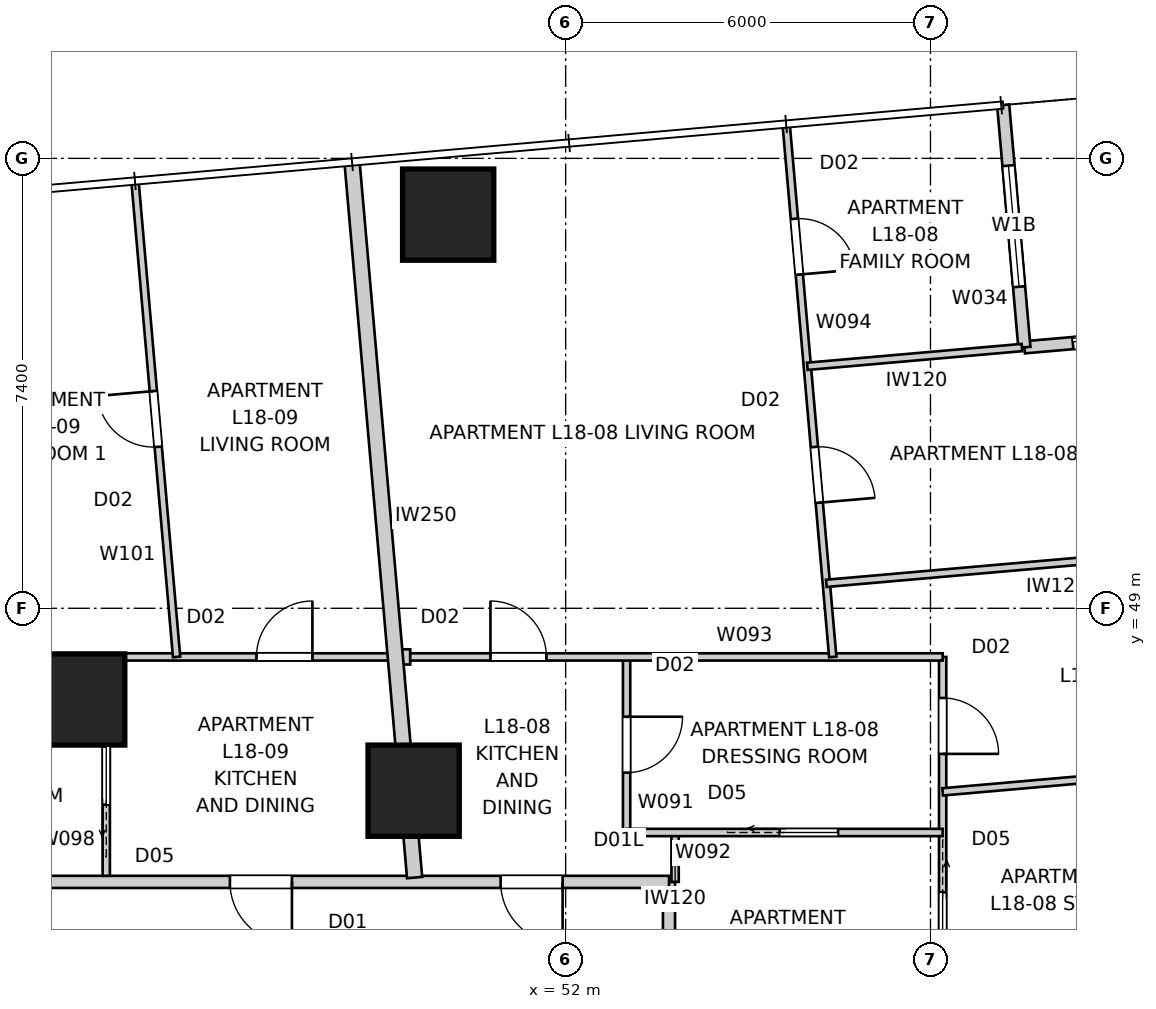
"""IFC4 building model, lengths in metres.
Left out: names, types, materials, properties, quantities, classifications, styles, units other than length and angle.
Written with IfcOpenShell. Run it as: python <this file> out.ifc"""

import sys

from ifc_helpers import new_model, si_unit, direction, frame, frame_2d, origin, origin_2d, place, context, subcontext, project, spatial, rectangle, extrude, element, fill, save


model = new_model("IFC4")
c1 = context("Model", 3, precision=1e-05, world=origin(), true_north=direction((0.0, 1.0)))
c2 = subcontext(c1, "Body", "Model", "MODEL_VIEW")
j1 = project(units=[si_unit("LENGTHUNIT", "METRE"), si_unit("PLANEANGLEUNIT", "RADIAN")], contexts=[c1])
p1 = place(None, origin())
s1 = spatial("IfcSite", under=j1, at=p1, CompositionType="ELEMENT")
p2 = place(p1, origin())
s2 = spatial("IfcBuilding", under=s1, at=p2, CompositionType="ELEMENT")
p3 = place(p2, frame((0.0, 0.0, 67.6)))
s3 = spatial("IfcBuildingStorey", under=s2, at=p3, CompositionType="ELEMENT", Elevation=67.6)
for number, where, z_axis, x_axis in (
    (1, (50.068, 55.474, 0.0), (0.0, 0.0, 1.0), (1.0, 0.0, 0.0)),
    (2, (49.5, 46.0, 0.0), (0.0, 0.0, 1.0), (1.0, 0.0, 0.0)),
    (3, (44.0, 47.5, 0.0), (0.0, 0.0, 1.0), (1.0, 0.0, 0.0)),
):
    element("IfcColumn", number, at=place(p3, frame(where, z_axis=z_axis, x_axis=x_axis)), inside=s3, PredefinedType="COLUMN", context=c2, shape_type="SweptSolid", body=[
        extrude(rectangle(XDim=1.5, YDim=1.5, at=origin_2d()), origin(), (0.0, 0.0, 1.0), 3.4),
    ])
p4 = place(p3, frame((63.529, 53.641, 0.0), z_axis=(0.0, 0.0, 1.0), x_axis=(-0.99619418125, -0.087161650072, 0.0)))
e4 = element("IfcWall", 4, at=p4, inside=s3, PredefinedType="SOLIDWALL", context=c2, shape_type="SweptSolid", body=[
    extrude(rectangle(XDim=4.0, YDim=0.2, at=frame_2d((2.0, 0.0))), origin(), (0.0, 0.0, 1.0), 3.25),
])
p5 = place(p4, frame((0.8, 0.0, 0.0)))
e5 = element("IfcOpeningElement", 5, at=p5, cuts=e4, PredefinedType="OPENING", context=c2, shape_type="SweptSolid", body=[
    extrude(rectangle(XDim=2.4, YDim=2.1, at=frame_2d((1.2, 1.05))), frame((0.0, 0.11, 0.0), z_axis=(0.0, -1.0, 0.0), x_axis=(1.0, 0.0, 0.0)), (0.0, 0.0, 1.0), 0.22),
])
p6 = place(p3, frame((59.544, 53.292, 0.0), z_axis=(0.0, 0.0, 1.0), x_axis=(-0.087156350505, 0.99619464492, 0.0)))
e6 = element("IfcWall", 6, at=p6, inside=s3, PredefinedType="SOLIDWALL", context=c2, shape_type="SweptSolid", body=[
    extrude(rectangle(XDim=4.0, YDim=0.2, at=frame_2d((2.0, 0.0))), origin(), (0.0, 0.0, 1.0), 3.25),
])
p7 = place(p6, frame((1.0, 0.0, 0.45)))
e7 = element("IfcOpeningElement", 7, at=p7, cuts=e6, PredefinedType="OPENING", context=c2, shape_type="SweptSolid", body=[
    extrude(rectangle(XDim=2.0, YDim=1.8, at=frame_2d((1.0, 0.9))), frame((0.0, 0.11, 0.0), z_axis=(0.0, -1.0, 0.0), x_axis=(1.0, 0.0, 0.0)), (0.0, 0.0, 1.0), 0.22),
])
p8 = place(p3, frame((53.7, 16.3, 0.0), z_axis=(0.0, 0.0, 1.0), x_axis=(0.0, 1.0, 0.0)))
e8 = element("IfcWall", 8, at=p8, inside=s3, PredefinedType="PARTITIONING", context=c2, shape_type="SweptSolid", body=[
    extrude(rectangle(XDim=28.2, YDim=0.2, at=frame_2d((14.1, 0.0))), origin(), (0.0, 0.0, 1.0), 3.25),
])
p9 = place(p8, frame((15.716, 0.0, 0.0)))
e9 = element("IfcOpeningElement", 9, at=p9, cuts=e8, PredefinedType="OPENING", context=c2, shape_type="SweptSolid", body=[
    extrude(rectangle(XDim=1.02, YDim=2.34, at=frame_2d((0.51, 1.17))), frame((0.0, 0.11, 0.0), z_axis=(0.0, -1.0, 0.0), x_axis=(1.0, 0.0, 0.0)), (0.0, 0.0, 1.0), 0.22),
])
p10 = place(p8, frame((5.572, 0.0, 0.0)))
e10 = element("IfcOpeningElement", 10, at=p10, cuts=e8, PredefinedType="OPENING", context=c2, shape_type="SweptSolid", body=[
    extrude(rectangle(XDim=1.02, YDim=2.34, at=frame_2d((0.51, 1.17))), frame((0.0, 0.11, 0.0), z_axis=(0.0, -1.0, 0.0), x_axis=(1.0, 0.0, 0.0)), (0.0, 0.0, 1.0), 0.22),
])
p11 = place(p8, frame((1.715, 0.0, 0.0)))
e11 = element("IfcOpeningElement", 11, at=p11, cuts=e8, PredefinedType="OPENING", context=c2, shape_type="SweptSolid", body=[
    extrude(rectangle(XDim=1.02, YDim=2.1, at=frame_2d((0.51, 1.05))), frame((0.0, 0.11, 0.0), z_axis=(0.0, -1.0, 0.0), x_axis=(1.0, 0.0, 0.0)), (0.0, 0.0, 1.0), 0.22),
])
p12 = place(p3, frame((53.7, 44.5, 0.0), z_axis=(0.0, 0.0, 1.0), x_axis=(-1.0, 0.0, 0.0)))
e12 = element("IfcWall", 12, at=p12, inside=s3, PredefinedType="PARTITIONING", context=c2, shape_type="SweptSolid", body=[
    extrude(rectangle(XDim=28.2, YDim=0.2, at=frame_2d((14.1, 0.0))), origin(), (0.0, 0.0, 1.0), 3.25),
])
p13 = place(p12, frame((21.321, 0.0, 0.0)))
e13 = element("IfcOpeningElement", 13, at=p13, cuts=e12, PredefinedType="OPENING", context=c2, shape_type="SweptSolid", body=[
    extrude(rectangle(XDim=1.02, YDim=2.34, at=frame_2d((0.51, 1.17))), frame((0.0, 0.11, 0.0), z_axis=(0.0, -1.0, 0.0), x_axis=(1.0, 0.0, 0.0)), (0.0, 0.0, 1.0), 0.22),
])
p14 = place(p12, frame((6.201, 0.0, 0.0)))
e14 = element("IfcOpeningElement", 14, at=p14, cuts=e12, PredefinedType="OPENING", context=c2, shape_type="SweptSolid", body=[
    extrude(rectangle(XDim=1.02, YDim=2.34, at=frame_2d((0.51, 1.17))), frame((0.0, 0.11, 0.0), z_axis=(0.0, -1.0, 0.0), x_axis=(1.0, 0.0, 0.0)), (0.0, 0.0, 1.0), 0.22),
])
p15 = place(p12, frame((1.75, 0.0, 0.0)))
e15 = element("IfcOpeningElement", 15, at=p15, cuts=e12, PredefinedType="OPENING", context=c2, shape_type="SweptSolid", body=[
    extrude(rectangle(XDim=1.02, YDim=2.1, at=frame_2d((0.51, 1.05))), frame((0.0, 0.11, 0.0), z_axis=(0.0, -1.0, 0.0), x_axis=(1.0, 0.0, 0.0)), (0.0, 0.0, 1.0), 0.22),
])
p16 = place(p3, frame((48.487, 56.34, 0.0), z_axis=(0.0, 0.0, 1.0), x_axis=(0.087168232078, -0.996193605338, 0.0)))
e16 = element("IfcWall", 16, at=p16, inside=s3, PredefinedType="PARTITIONING", context=c2, shape_type="SweptSolid", body=[
    extrude(rectangle(XDim=11.814, YDim=0.25, at=frame_2d((5.907, 0.0))), origin(), (0.0, 0.0, 1.0), 3.25),
])
p17 = place(p3, frame((49.223, 48.2, 0.0), z_axis=(0.0, 0.0, 1.0), x_axis=(0.999999388167, -0.001106194013, 0.0)))
e17 = element("IfcWall", 17, at=p17, inside=s3, PredefinedType="PARTITIONING", context=c2, shape_type="SweptSolid", body=[
    extrude(rectangle(XDim=0.221, YDim=0.25, at=frame_2d((0.11, 0.0))), origin(), (0.0, 0.0, 1.0), 3.25),
])
p18 = place(p3, frame((58.2, 48.2, 0.0), z_axis=(0.0, 0.0, 1.0), x_axis=(0.0, -1.0, 0.0)))
e18 = element("IfcWall", 18, at=p18, inside=s3, PredefinedType="PARTITIONING", context=c2, shape_type="SweptSolid", body=[
    extrude(rectangle(XDim=20.7, YDim=0.12, at=frame_2d((10.35, 0.0))), origin(), (0.0, 0.0, 1.0), 3.25),
])
p19 = place(p18, frame((15.095, 0.0, 0.0)))
e19 = element("IfcOpeningElement", 19, at=p19, cuts=e18, PredefinedType="OPENING", context=c2, shape_type="SweptSolid", body=[
    extrude(rectangle(XDim=0.92, YDim=2.34, at=frame_2d((0.46, 1.17))), frame((0.0, 0.07, 0.0), z_axis=(0.0, -1.0, 0.0), x_axis=(1.0, 0.0, 0.0)), (0.0, 0.0, 1.0), 0.14),
])
p20 = place(p18, frame((18.521, 0.0, 0.0)))
e20 = element("IfcOpeningElement", 20, at=p20, cuts=e18, PredefinedType="OPENING", context=c2, shape_type="SweptSolid", body=[
    extrude(rectangle(XDim=0.96, YDim=2.1, at=frame_2d((0.48, 1.05))), frame((0.0, 0.07, 0.0), z_axis=(0.0, -1.0, 0.0), x_axis=(1.0, 0.0, 0.0)), (0.0, 0.0, 1.0), 0.14),
])
p21 = place(p18, frame((0.675, 0.0, 0.0)))
e21 = element("IfcOpeningElement", 21, at=p21, cuts=e18, PredefinedType="OPENING", context=c2, shape_type="SweptSolid", body=[
    extrude(rectangle(XDim=0.92, YDim=2.34, at=frame_2d((0.46, 1.17))), frame((0.0, 0.07, 0.0), z_axis=(0.0, -1.0, 0.0), x_axis=(1.0, 0.0, 0.0)), (0.0, 0.0, 1.0), 0.14),
])
p22 = place(p18, frame((3.872, 0.0, 0.0)))
e22 = element("IfcOpeningElement", 22, at=p22, cuts=e18, PredefinedType="OPENING", context=c2, shape_type="SweptSolid", body=[
    extrude(rectangle(XDim=0.96, YDim=2.1, at=frame_2d((0.48, 1.05))), frame((0.0, 0.07, 0.0), z_axis=(0.0, -1.0, 0.0), x_axis=(1.0, 0.0, 0.0)), (0.0, 0.0, 1.0), 0.14),
])
p23 = place(p3, frame((53.8, 45.312, 0.0), z_axis=(0.0, 0.0, 1.0), x_axis=(0.0, -1.0, 0.0)))
e23 = element("IfcWall", 23, at=p23, inside=s3, PredefinedType="PARTITIONING", context=c2, shape_type="SweptSolid", body=[
    extrude(rectangle(XDim=0.812, YDim=0.12, at=frame_2d((0.406, 0.0))), origin(), (0.0, 0.0, 1.0), 3.25),
])
p24 = place(p3, frame((53.002, 48.2, 0.0), z_axis=(0.0, 0.0, 1.0), x_axis=(0.0, -1.0, 0.0)))
e24 = element("IfcWall", 24, at=p24, inside=s3, PredefinedType="PARTITIONING", context=c2, shape_type="SweptSolid", body=[
    extrude(rectangle(XDim=2.887, YDim=0.12, at=frame_2d((1.444, 0.0))), origin(), (0.0, 0.0, 1.0), 2.638),
])
p25 = place(p24, frame((0.984, 0.0, 0.0)))
e25 = element("IfcOpeningElement", 25, at=p25, cuts=e24, PredefinedType="OPENING", context=c2, shape_type="SweptSolid", body=[
    extrude(rectangle(XDim=0.92, YDim=2.34, at=frame_2d((0.46, 1.17))), frame((0.0, 0.07, 0.0), z_axis=(0.0, -1.0, 0.0), x_axis=(1.0, 0.0, 0.0)), (0.0, 0.0, 1.0), 0.14),
])
p26 = place(p3, frame((53.002, 45.312, 0.0), z_axis=(0.0, 0.0, 1.0), x_axis=(1.0, 0.0, 0.0)))
e26 = element("IfcWall", 26, at=p26, inside=s3, PredefinedType="PARTITIONING", context=c2, shape_type="SweptSolid", body=[
    extrude(rectangle(XDim=5.198, YDim=0.12, at=frame_2d((2.599, 0.0))), origin(), (0.0, 0.0, 1.0), 3.25),
])
p27 = place(p26, frame((2.518, 0.0, 0.0)))
e27 = element("IfcOpeningElement", 27, at=p27, cuts=e26, PredefinedType="OPENING", context=c2, shape_type="SweptSolid", body=[
    extrude(rectangle(XDim=0.96, YDim=2.1, at=frame_2d((0.48, 1.05))), frame((0.0, 0.07, 0.0), z_axis=(0.0, -1.0, 0.0), x_axis=(1.0, 0.0, 0.0)), (0.0, 0.0, 1.0), 0.14),
])
p28 = place(p3, frame((49.444, 48.2, 0.0), z_axis=(0.0, 0.0, 1.0), x_axis=(1.0, 0.0, 0.0)))
e28 = element("IfcWall", 28, at=p28, inside=s3, PredefinedType="PARTITIONING", context=c2, shape_type="SweptSolid", body=[
    extrude(rectangle(XDim=8.756, YDim=0.12, at=frame_2d((4.378, 0.0))), origin(), (0.0, 0.0, 1.0), 3.25),
])
p29 = place(p28, frame((1.319, 0.0, 0.0)))
e29 = element("IfcOpeningElement", 29, at=p29, cuts=e28, PredefinedType="OPENING", context=c2, shape_type="SweptSolid", body=[
    extrude(rectangle(XDim=0.92, YDim=2.34, at=frame_2d((0.46, 1.17))), frame((0.0, 0.07, 0.0), z_axis=(0.0, -1.0, 0.0), x_axis=(1.0, 0.0, 0.0)), (0.0, 0.0, 1.0), 0.14),
])
p30 = place(p3, frame((55.629, 56.925, 0.0), z_axis=(0.0, 0.0, 1.0), x_axis=(0.087169716747, -0.996193475426, 0.0)))
e30 = element("IfcWall", 30, at=p30, inside=s3, PredefinedType="PARTITIONING", context=c2, shape_type="SweptSolid", body=[
    extrude(rectangle(XDim=8.758, YDim=0.12, at=frame_2d((4.379, 0.0))), origin(), (0.0, 0.0, 1.0), 3.25),
])
p31 = place(p30, frame((1.525, 0.0, 0.0)))
e31 = element("IfcOpeningElement", 31, at=p31, cuts=e30, PredefinedType="OPENING", context=c2, shape_type="SweptSolid", body=[
    extrude(rectangle(XDim=0.92, YDim=2.34, at=frame_2d((0.46, 1.17))), frame((0.0, 0.07, 0.0), z_axis=(0.0, -1.0, 0.0), x_axis=(1.0, 0.0, 0.0)), (0.0, 0.0, 1.0), 0.14),
])
p32 = place(p30, frame((5.292, 0.0, 0.0)))
e32 = element("IfcOpeningElement", 32, at=p32, cuts=e30, PredefinedType="OPENING", context=c2, shape_type="SweptSolid", body=[
    extrude(rectangle(XDim=0.92, YDim=2.34, at=frame_2d((0.46, 1.17))), frame((0.0, 0.07, 0.0), z_axis=(0.0, -1.0, 0.0), x_axis=(1.0, 0.0, 0.0)), (0.0, 0.0, 1.0), 0.14),
])
p33 = place(p3, frame((63.802, 50.067, 0.0), z_axis=(0.0, 0.0, 1.0), x_axis=(-0.996194420069, -0.087158920508, 0.0)))
e33 = element("IfcWall", 33, at=p33, inside=s3, PredefinedType="PARTITIONING", context=c2, shape_type="SweptSolid", body=[
    extrude(rectangle(XDim=7.543, YDim=0.12, at=frame_2d((3.772, 0.0))), origin(), (0.0, 0.0, 1.0), 3.25),
])
p34 = place(p3, frame((55.975, 52.98, 0.0), z_axis=(0.0, 0.0, 1.0), x_axis=(0.996194166221, 0.087161821847, 0.0)))
e34 = element("IfcWall", 34, at=p34, inside=s3, PredefinedType="PARTITIONING", context=c2, shape_type="SweptSolid", body=[
    extrude(rectangle(XDim=3.543, YDim=0.12, at=frame_2d((1.771, 0.0))), origin(), (0.0, 0.0, 1.0), 3.25),
])
p35 = place(p3, frame((64.114, 46.498, 0.0), z_axis=(0.0, 0.0, 1.0), x_axis=(-0.996195547509, -0.087146033323, 0.0)))
e35 = element("IfcWall", 35, at=p35, inside=s3, PredefinedType="PARTITIONING", context=c2, shape_type="SweptSolid", body=[
    extrude(rectangle(XDim=5.937, YDim=0.12, at=frame_2d((2.968, 0.0))), origin(), (0.0, 0.0, 1.0), 2.638),
])
p36 = place(p3, frame((44.445, 44.6, 0.0), z_axis=(0.0, 0.0, 1.0), x_axis=(0.0, 1.0, 0.0)))
e36 = element("IfcWall", 36, at=p36, inside=s3, PredefinedType="PARTITIONING", context=c2, shape_type="SweptSolid", body=[
    extrude(rectangle(XDim=3.6, YDim=0.12, at=frame_2d((1.8, 0.0))), origin(), (0.0, 0.0, 1.0), 3.25),
])
p37 = place(p36, frame((1.17, 0.0, 0.0)))
e37 = element("IfcOpeningElement", 37, at=p37, cuts=e36, PredefinedType="OPENING", context=c2, shape_type="SweptSolid", body=[
    extrude(rectangle(XDim=0.96, YDim=2.1, at=frame_2d((0.48, 1.05))), frame((0.0, 0.07, 0.0), z_axis=(0.0, -1.0, 0.0), x_axis=(1.0, 0.0, 0.0)), (0.0, 0.0, 1.0), 0.14),
])
p38 = place(p3, frame((21.8, 48.2, 0.0), z_axis=(0.0, 0.0, 1.0), x_axis=(1.0, 0.0, 0.0)))
e38 = element("IfcWall", 38, at=p38, inside=s3, PredefinedType="PARTITIONING", context=c2, shape_type="SweptSolid", body=[
    extrude(rectangle(XDim=27.399, YDim=0.12, at=frame_2d((13.699, 0.0))), origin(), (0.0, 0.0, 1.0), 3.25),
])
p39 = place(p38, frame((7.18, 0.0, 0.0)))
e39 = element("IfcOpeningElement", 39, at=p39, cuts=e38, PredefinedType="OPENING", context=c2, shape_type="SweptSolid", body=[
    extrude(rectangle(XDim=0.92, YDim=2.34, at=frame_2d((0.46, 1.17))), frame((0.0, 0.07, 0.0), z_axis=(0.0, -1.0, 0.0), x_axis=(1.0, 0.0, 0.0)), (0.0, 0.0, 1.0), 0.14),
])
p40 = place(p38, frame((10.167, 0.0, 0.0)))
e40 = element("IfcOpeningElement", 40, at=p40, cuts=e38, PredefinedType="OPENING", context=c2, shape_type="SweptSolid", body=[
    extrude(rectangle(XDim=0.92, YDim=2.34, at=frame_2d((0.46, 1.17))), frame((0.0, 0.07, 0.0), z_axis=(0.0, -1.0, 0.0), x_axis=(1.0, 0.0, 0.0)), (0.0, 0.0, 1.0), 0.14),
])
p41 = place(p38, frame((25.115, 0.0, 0.0)))
e41 = element("IfcOpeningElement", 41, at=p41, cuts=e38, PredefinedType="OPENING", context=c2, shape_type="SweptSolid", body=[
    extrude(rectangle(XDim=0.92, YDim=2.34, at=frame_2d((0.46, 1.17))), frame((0.0, 0.07, 0.0), z_axis=(0.0, -1.0, 0.0), x_axis=(1.0, 0.0, 0.0)), (0.0, 0.0, 1.0), 0.14),
])
p42 = place(p38, frame((3.513, 0.0, 0.0)))
e42 = element("IfcOpeningElement", 42, at=p42, cuts=e38, PredefinedType="OPENING", context=c2, shape_type="SweptSolid", body=[
    extrude(rectangle(XDim=0.96, YDim=2.1, at=frame_2d((0.48, 1.05))), frame((0.0, 0.07, 0.0), z_axis=(0.0, -1.0, 0.0), x_axis=(1.0, 0.0, 0.0)), (0.0, 0.0, 1.0), 0.14),
])
p43 = place(p38, frame((0.655, 0.0, 0.0)))
e43 = element("IfcOpeningElement", 43, at=p43, cuts=e38, PredefinedType="OPENING", context=c2, shape_type="SweptSolid", body=[
    extrude(rectangle(XDim=0.96, YDim=2.1, at=frame_2d((0.48, 1.05))), frame((0.0, 0.07, 0.0), z_axis=(0.0, -1.0, 0.0), x_axis=(1.0, 0.0, 0.0)), (0.0, 0.0, 1.0), 0.14),
])
p44 = place(p38, frame((15.083, 0.0, 0.0)))
e44 = element("IfcOpeningElement", 44, at=p44, cuts=e38, PredefinedType="OPENING", context=c2, shape_type="SweptSolid", body=[
    extrude(rectangle(XDim=0.96, YDim=2.1, at=frame_2d((0.48, 1.05))), frame((0.0, 0.07, 0.0), z_axis=(0.0, -1.0, 0.0), x_axis=(1.0, 0.0, 0.0)), (0.0, 0.0, 1.0), 0.14),
])
p45 = place(p38, frame((17.516, 0.0, 0.0)))
e45 = element("IfcOpeningElement", 45, at=p45, cuts=e38, PredefinedType="OPENING", context=c2, shape_type="SweptSolid", body=[
    extrude(rectangle(XDim=0.96, YDim=2.1, at=frame_2d((0.48, 1.05))), frame((0.0, 0.07, 0.0), z_axis=(0.0, -1.0, 0.0), x_axis=(1.0, 0.0, 0.0)), (0.0, 0.0, 1.0), 0.14),
])
p46 = place(p3, frame((45.602, 48.2, 0.0), z_axis=(0.0, 0.0, 1.0), x_axis=(-0.087161914023, 0.996194158156, 0.0)))
e46 = element("IfcWall", 46, at=p46, inside=s3, PredefinedType="PARTITIONING", context=c2, shape_type="SweptSolid", body=[
    extrude(rectangle(XDim=7.818, YDim=0.12, at=frame_2d((3.909, 0.0))), origin(), (0.0, 0.0, 1.0), 3.25),
])
p47 = place(p46, frame((3.469, 0.0, 0.0)))
e47 = element("IfcOpeningElement", 47, at=p47, cuts=e46, PredefinedType="OPENING", context=c2, shape_type="SweptSolid", body=[
    extrude(rectangle(XDim=0.92, YDim=2.34, at=frame_2d((0.46, 1.17))), frame((0.0, 0.07, 0.0), z_axis=(0.0, -1.0, 0.0), x_axis=(1.0, 0.0, 0.0)), (0.0, 0.0, 1.0), 0.14),
])
p48 = place(p5, origin())
e48 = element("IfcDoor", 48, at=p48, inside=s3, OperationType="SLIDING_TO_LEFT", PredefinedType="DOOR", context=c2, shape_type="SweptSolid", body=[
    extrude(rectangle(XDim=2.4, YDim=2.1, at=frame_2d((1.2, 1.05))), frame((0.0, 0.025, 0.0), z_axis=(0.0, -1.0, 0.0), x_axis=(1.0, 0.0, 0.0)), (0.0, 0.0, 1.0), 0.05),
])
fill(e5, e48)
p49 = place(p7, origin())
e49 = element("IfcWindow", 49, at=p49, inside=s3, PartitioningType="SINGLE_PANEL", PredefinedType="WINDOW", context=c2, shape_type="SweptSolid", body=[
    extrude(rectangle(XDim=2.0, YDim=1.8, at=frame_2d((1.0, 0.9))), frame((0.0, 0.03, 0.0), z_axis=(0.0, -1.0, 0.0), x_axis=(1.0, 0.0, 0.0)), (0.0, 0.0, 1.0), 0.06),
])
fill(e7, e49)
p50 = place(p14, origin())
e50 = element("IfcDoor", 50, at=p50, inside=s3, OperationType="SINGLE_SWING_LEFT", PredefinedType="DOOR", context=c2, shape_type="SweptSolid", body=[
    extrude(rectangle(XDim=1.02, YDim=2.34, at=frame_2d((0.51, 1.17))), frame((0.0, 0.025, 0.0), z_axis=(0.0, -1.0, 0.0), x_axis=(1.0, 0.0, 0.0)), (0.0, 0.0, 1.0), 0.05),
])
fill(e14, e50)
p51 = place(p15, origin())
e51 = element("IfcDoor", 51, at=p51, inside=s3, OperationType="SINGLE_SWING_LEFT", PredefinedType="DOOR", context=c2, shape_type="SweptSolid", body=[
    extrude(rectangle(XDim=1.02, YDim=2.1, at=frame_2d((0.51, 1.05))), frame((0.0, 0.025, 0.0), z_axis=(0.0, -1.0, 0.0), x_axis=(1.0, 0.0, 0.0)), (0.0, 0.0, 1.0), 0.05),
])
fill(e15, e51)
p52 = place(p41, origin())
e52 = element("IfcDoor", 52, at=p52, inside=s3, OperationType="SINGLE_SWING_RIGHT", PredefinedType="DOOR", context=c2, shape_type="SweptSolid", body=[
    extrude(rectangle(XDim=0.92, YDim=2.34, at=frame_2d((0.46, 1.17))), frame((0.0, 0.025, 0.0), z_axis=(0.0, -1.0, 0.0), x_axis=(1.0, 0.0, 0.0)), (0.0, 0.0, 1.0), 0.05),
])
fill(e41, e52)
p53 = place(p37, origin())
e53 = element("IfcDoor", 53, at=p53, inside=s3, OperationType="SLIDING_TO_LEFT", PredefinedType="DOOR", context=c2, shape_type="SweptSolid", body=[
    extrude(rectangle(XDim=0.96, YDim=2.1, at=frame_2d((0.48, 1.05))), frame((0.0, 0.025, 0.0), z_axis=(0.0, -1.0, 0.0), x_axis=(1.0, 0.0, 0.0)), (0.0, 0.0, 1.0), 0.05),
])
fill(e37, e53)
p54 = place(p29, origin())
e54 = element("IfcDoor", 54, at=p54, inside=s3, OperationType="SINGLE_SWING_LEFT", PredefinedType="DOOR", context=c2, shape_type="SweptSolid", body=[
    extrude(rectangle(XDim=0.92, YDim=2.34, at=frame_2d((0.46, 1.17))), frame((0.0, 0.025, 0.0), z_axis=(0.0, -1.0, 0.0), x_axis=(1.0, 0.0, 0.0)), (0.0, 0.0, 1.0), 0.05),
])
fill(e29, e54)
p55 = place(p25, origin())
e55 = element("IfcDoor", 55, at=p55, inside=s3, OperationType="SINGLE_SWING_LEFT", PredefinedType="DOOR", context=c2, shape_type="SweptSolid", body=[
    extrude(rectangle(XDim=0.92, YDim=2.34, at=frame_2d((0.46, 1.17))), frame((0.0, 0.025, 0.0), z_axis=(0.0, -1.0, 0.0), x_axis=(1.0, 0.0, 0.0)), (0.0, 0.0, 1.0), 0.05),
])
fill(e25, e55)
p56 = place(p47, origin())
e56 = element("IfcDoor", 56, at=p56, inside=s3, OperationType="SINGLE_SWING_RIGHT", PredefinedType="DOOR", context=c2, shape_type="SweptSolid", body=[
    extrude(rectangle(XDim=0.92, YDim=2.34, at=frame_2d((0.46, 1.17))), frame((0.0, 0.025, 0.0), z_axis=(0.0, -1.0, 0.0), x_axis=(1.0, 0.0, 0.0)), (0.0, 0.0, 1.0), 0.05),
])
fill(e47, e56)
p57 = place(p31, origin())
e57 = element("IfcDoor", 57, at=p57, inside=s3, OperationType="SINGLE_SWING_RIGHT", PredefinedType="DOOR", context=c2, shape_type="SweptSolid", body=[
    extrude(rectangle(XDim=0.92, YDim=2.34, at=frame_2d((0.46, 1.17))), frame((0.0, 0.025, 0.0), z_axis=(0.0, -1.0, 0.0), x_axis=(1.0, 0.0, 0.0)), (0.0, 0.0, 1.0), 0.05),
])
fill(e31, e57)
p58 = place(p32, origin())
e58 = element("IfcDoor", 58, at=p58, inside=s3, OperationType="SINGLE_SWING_RIGHT", PredefinedType="DOOR", context=c2, shape_type="SweptSolid", body=[
    extrude(rectangle(XDim=0.92, YDim=2.34, at=frame_2d((0.46, 1.17))), frame((0.0, 0.025, 0.0), z_axis=(0.0, -1.0, 0.0), x_axis=(1.0, 0.0, 0.0)), (0.0, 0.0, 1.0), 0.05),
])
fill(e32, e58)
p59 = place(p27, origin())
e59 = element("IfcDoor", 59, at=p59, inside=s3, OperationType="SLIDING_TO_LEFT", PredefinedType="DOOR", context=c2, shape_type="SweptSolid", body=[
    extrude(rectangle(XDim=0.96, YDim=2.1, at=frame_2d((0.48, 1.05))), frame((0.0, 0.025, 0.0), z_axis=(0.0, -1.0, 0.0), x_axis=(1.0, 0.0, 0.0)), (0.0, 0.0, 1.0), 0.05),
])
fill(e27, e59)
p60 = place(p21, origin())
e60 = element("IfcDoor", 60, at=p60, inside=s3, OperationType="SINGLE_SWING_RIGHT", PredefinedType="DOOR", context=c2, shape_type="SweptSolid", body=[
    extrude(rectangle(XDim=0.92, YDim=2.34, at=frame_2d((0.46, 1.17))), frame((0.0, 0.025, 0.0), z_axis=(0.0, -1.0, 0.0), x_axis=(1.0, 0.0, 0.0)), (0.0, 0.0, 1.0), 0.05),
])
fill(e21, e60)
p61 = place(p22, origin())
e61 = element("IfcDoor", 61, at=p61, inside=s3, OperationType="SLIDING_TO_LEFT", PredefinedType="DOOR", context=c2, shape_type="SweptSolid", body=[
    extrude(rectangle(XDim=0.96, YDim=2.1, at=frame_2d((0.48, 1.05))), frame((0.0, 0.025, 0.0), z_axis=(0.0, -1.0, 0.0), x_axis=(1.0, 0.0, 0.0)), (0.0, 0.0, 1.0), 0.05),
])
fill(e22, e61)
save(model, sys.argv[1])
